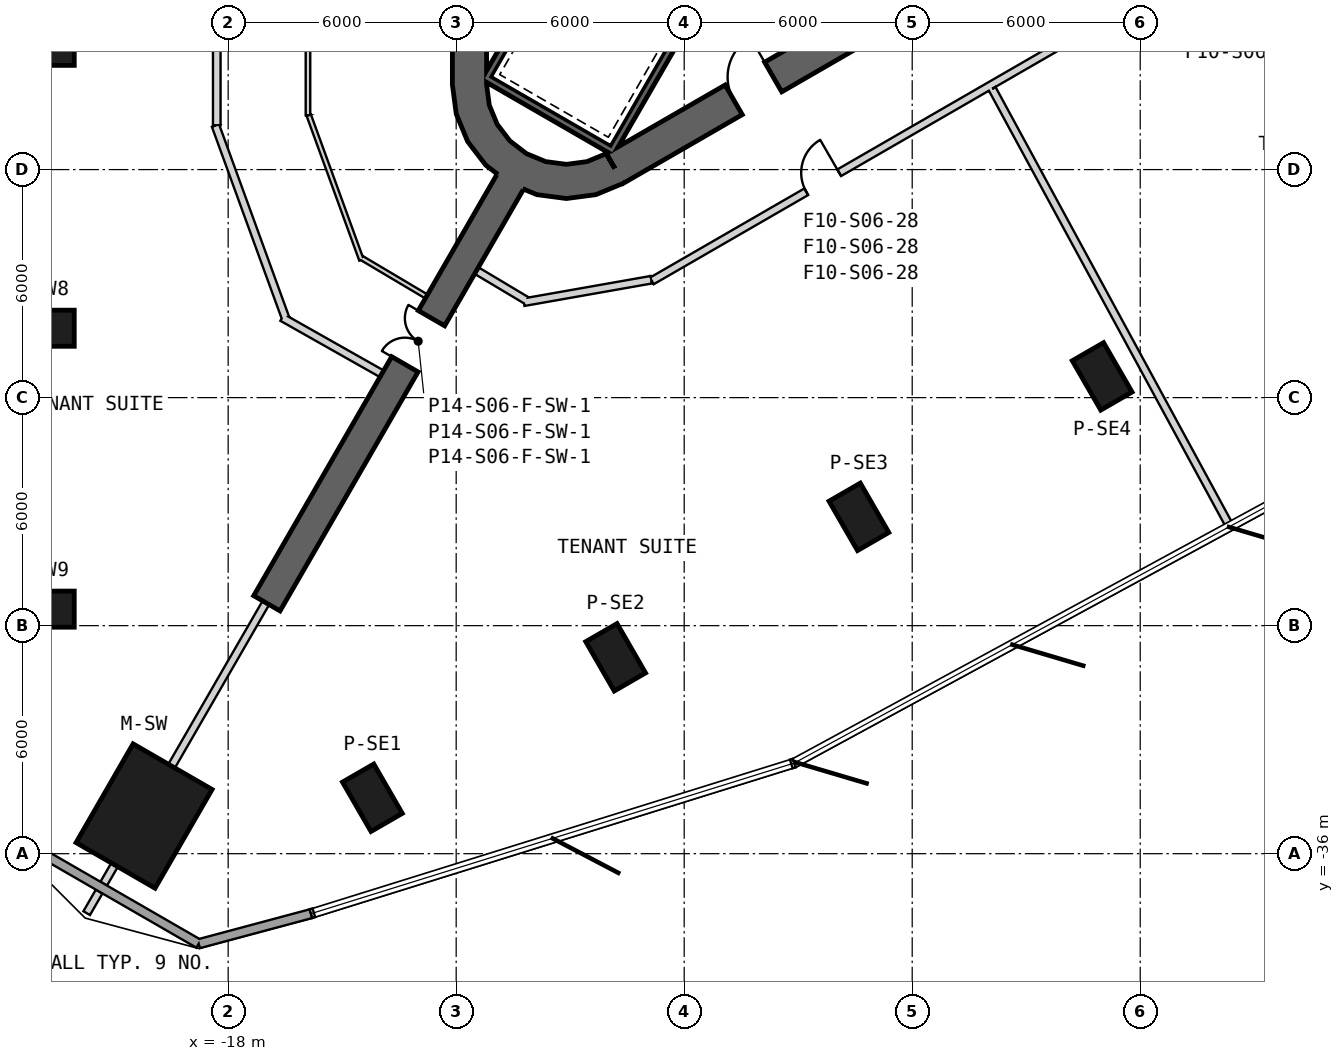
"""IFC4 building model, lengths in metres.
Left out: names, types, materials, properties, quantities, classifications, styles, units other than length and angle.
Written with IfcOpenShell. Run it as: python <this file> out.ifc"""

import sys

from ifc_helpers import new_model, si_unit, direction, frame, frame_2d, origin, origin_2d, place, context, subcontext, project, spatial, polyline, rectangle, outline, extrude, element, fill, save


model = new_model("IFC4")
c1 = context("Model", 3, precision=1e-05, world=origin(), true_north=direction((0.0, 1.0)))
c2 = subcontext(c1, "Body", "Model", "MODEL_VIEW")
j1 = project(units=[si_unit("LENGTHUNIT", "METRE"), si_unit("PLANEANGLEUNIT", "RADIAN")], contexts=[c1])
p1 = place(None, origin())
s1 = spatial("IfcSite", under=j1, at=p1, CompositionType="ELEMENT")
p2 = place(p1, origin())
s2 = spatial("IfcBuilding", under=s1, at=p2, CompositionType="ELEMENT")
p3 = place(p2, frame((0.0, 0.0, 119.3)))
s3 = spatial("IfcBuildingStorey", under=s2, at=p3, CompositionType="ELEMENT", Elevation=119.3)
p4 = place(p3, frame((-20.213, -35.01, 0.0), z_axis=(0.0, 0.0, 1.0), x_axis=(-0.5, -0.866025403784, 0.0)))
e1 = element("IfcColumn", 1, at=p4, inside=s3, PredefinedType="COLUMN", context=c2, shape_type="SweptSolid", body=[
    extrude(rectangle(XDim=3.0, YDim=2.4, at=origin_2d()), origin(), (0.0, 0.0, 1.0), 4.1),
])
for number, where, z_axis, x_axis in (
    (2, (-22.8, -14.783, 0.0), (0.0, 0.0, 1.0), (-1.0, 0.0, 0.0)),
    (3, (-22.8, -22.174, 0.0), (0.0, 0.0, 1.0), (-1.0, 0.0, 0.0)),
    (4, (-22.8, -29.566, 0.0), (0.0, 0.0, 1.0), (-1.0, 0.0, 0.0)),
    (5, (-14.205, -34.528, 0.0), (0.0, 0.0, 1.0), (0.5, -0.866, 0.0)),
    (6, (-7.803, -30.833, 0.0), (0.0, 0.0, 1.0), (0.5, -0.866, 0.0)),
    (7, (-1.402, -27.137, 0.0), (0.0, 0.0, 1.0), (0.5, -0.866, 0.0)),
    (8, (4.999, -23.441, 0.0), (0.0, 0.0, 1.0), (0.5, -0.866, 0.0)),
):
    element("IfcColumn", number, at=place(p3, frame(where, z_axis=z_axis, x_axis=x_axis)), inside=s3, PredefinedType="COLUMN", context=c2, shape_type="SweptSolid", body=[
        extrude(rectangle(XDim=1.5, YDim=0.95, at=origin_2d()), origin(), (0.0, 0.0, 1.0), 4.1),
    ])
p5 = place(p3, frame((-11.65, 15.762, 0.0), z_axis=(0.0, 0.0, 1.0), x_axis=(0.0, -1.0, 0.0)))
e9 = element("IfcWall", 9, at=p5, inside=s3, PredefinedType="SHEAR", context=c2, shape_type="SweptSolid", body=[
    extrude(rectangle(XDim=31.523, YDim=0.9, at=frame_2d((15.762, 0.0))), origin(), (0.0, 0.0, 1.0), 4.1),
])
p6 = place(p5, frame((7.062, 0.0, 0.0)))
e10 = element("IfcOpeningElement", 10, at=p6, cuts=e9, PredefinedType="OPENING", context=c2, shape_type="SweptSolid", body=[
    extrude(rectangle(XDim=1.2, YDim=2.4, at=frame_2d((0.6, 1.2))), frame((0.0, 0.46, 0.0), z_axis=(0.0, -1.0, 0.0), x_axis=(1.0, 0.0, 0.0)), (0.0, 0.0, 1.0), 0.92),
])
p7 = place(p5, frame((9.762, 0.0, 0.0)))
e11 = element("IfcOpeningElement", 11, at=p7, cuts=e9, PredefinedType="OPENING", context=c2, shape_type="SweptSolid", body=[
    extrude(rectangle(XDim=1.2, YDim=2.4, at=frame_2d((0.6, 1.2))), frame((0.0, 0.46, 0.0), z_axis=(0.0, -1.0, 0.0), x_axis=(1.0, 0.0, 0.0)), (0.0, 0.0, 1.0), 0.92),
])
p8 = place(p5, frame((12.462, 0.0, 0.0)))
e12 = element("IfcOpeningElement", 12, at=p8, cuts=e9, PredefinedType="OPENING", context=c2, shape_type="SweptSolid", body=[
    extrude(rectangle(XDim=1.2, YDim=2.4, at=frame_2d((0.6, 1.2))), frame((0.0, 0.46, 0.0), z_axis=(0.0, -1.0, 0.0), x_axis=(1.0, 0.0, 0.0)), (0.0, 0.0, 1.0), 0.92),
])
p9 = place(p5, frame((15.162, 0.0, 0.0)))
e13 = element("IfcOpeningElement", 13, at=p9, cuts=e9, PredefinedType="OPENING", context=c2, shape_type="SweptSolid", body=[
    extrude(rectangle(XDim=1.2, YDim=2.4, at=frame_2d((0.6, 1.2))), frame((0.0, 0.46, 0.0), z_axis=(0.0, -1.0, 0.0), x_axis=(1.0, 0.0, 0.0)), (0.0, 0.0, 1.0), 0.92),
])
p10 = place(p5, frame((17.862, 0.0, 0.0)))
e14 = element("IfcOpeningElement", 14, at=p10, cuts=e9, PredefinedType="OPENING", context=c2, shape_type="SweptSolid", body=[
    extrude(rectangle(XDim=1.2, YDim=2.4, at=frame_2d((0.6, 1.2))), frame((0.0, 0.46, 0.0), z_axis=(0.0, -1.0, 0.0), x_axis=(1.0, 0.0, 0.0)), (0.0, 0.0, 1.0), 0.92),
])
p11 = place(p5, frame((20.562, 0.0, 0.0)))
e15 = element("IfcOpeningElement", 15, at=p11, cuts=e9, PredefinedType="OPENING", context=c2, shape_type="SweptSolid", body=[
    extrude(rectangle(XDim=1.2, YDim=2.4, at=frame_2d((0.6, 1.2))), frame((0.0, 0.46, 0.0), z_axis=(0.0, -1.0, 0.0), x_axis=(1.0, 0.0, 0.0)), (0.0, 0.0, 1.0), 0.92),
])
p12 = place(p5, frame((23.262, 0.0, 0.0)))
e16 = element("IfcOpeningElement", 16, at=p12, cuts=e9, PredefinedType="OPENING", context=c2, shape_type="SweptSolid", body=[
    extrude(rectangle(XDim=1.2, YDim=2.4, at=frame_2d((0.6, 1.2))), frame((0.0, 0.46, 0.0), z_axis=(0.0, -1.0, 0.0), x_axis=(1.0, 0.0, 0.0)), (0.0, 0.0, 1.0), 0.92),
])
p13 = place(p5, frame((3.612, 0.0, 0.0)))
e17 = element("IfcOpeningElement", 17, at=p13, cuts=e9, PredefinedType="OPENING", context=c2, shape_type="SweptSolid", body=[
    extrude(rectangle(XDim=1.2, YDim=2.4, at=frame_2d((0.6, 1.2))), frame((0.0, 0.46, 0.0), z_axis=(0.0, -1.0, 0.0), x_axis=(1.0, 0.0, 0.0)), (0.0, 0.0, 1.0), 0.92),
])
p14 = place(p5, frame((26.712, 0.0, 0.0)))
e18 = element("IfcOpeningElement", 18, at=p14, cuts=e9, PredefinedType="OPENING", context=c2, shape_type="SweptSolid", body=[
    extrude(rectangle(XDim=1.2, YDim=2.4, at=frame_2d((0.6, 1.2))), frame((0.0, 0.46, 0.0), z_axis=(0.0, -1.0, 0.0), x_axis=(1.0, 0.0, 0.0)), (0.0, 0.0, 1.0), 0.92),
])
p15 = place(p3, frame((-7.825, -17.97, 0.0), z_axis=(0.0, 0.0, 1.0), x_axis=(0.866028369851, 0.499994862586, 0.0)))
e19 = element("IfcWall", 19, at=p15, inside=s3, PredefinedType="SHEAR", context=c2, shape_type="SweptSolid", body=[
    extrude(rectangle(XDim=31.523, YDim=0.9, at=frame_2d((15.762, 0.0))), origin(), (0.0, 0.0, 1.0), 4.1),
])
p16 = place(p15, frame((7.062, 0.0, 0.0)))
e20 = element("IfcOpeningElement", 20, at=p16, cuts=e19, PredefinedType="OPENING", context=c2, shape_type="SweptSolid", body=[
    extrude(rectangle(XDim=1.2, YDim=2.4, at=frame_2d((0.6, 1.2))), frame((0.0, 0.46, 0.0), z_axis=(0.0, -1.0, 0.0), x_axis=(1.0, 0.0, 0.0)), (0.0, 0.0, 1.0), 0.92),
])
p17 = place(p15, frame((9.762, 0.0, 0.0)))
e21 = element("IfcOpeningElement", 21, at=p17, cuts=e19, PredefinedType="OPENING", context=c2, shape_type="SweptSolid", body=[
    extrude(rectangle(XDim=1.2, YDim=2.4, at=frame_2d((0.6, 1.2))), frame((0.0, 0.46, 0.0), z_axis=(0.0, -1.0, 0.0), x_axis=(1.0, 0.0, 0.0)), (0.0, 0.0, 1.0), 0.92),
])
p18 = place(p15, frame((12.462, 0.0, 0.0)))
e22 = element("IfcOpeningElement", 22, at=p18, cuts=e19, PredefinedType="OPENING", context=c2, shape_type="SweptSolid", body=[
    extrude(rectangle(XDim=1.2, YDim=2.4, at=frame_2d((0.6, 1.2))), frame((0.0, 0.46, 0.0), z_axis=(0.0, -1.0, 0.0), x_axis=(1.0, 0.0, 0.0)), (0.0, 0.0, 1.0), 0.92),
])
p19 = place(p15, frame((15.162, 0.0, 0.0)))
e23 = element("IfcOpeningElement", 23, at=p19, cuts=e19, PredefinedType="OPENING", context=c2, shape_type="SweptSolid", body=[
    extrude(rectangle(XDim=1.2, YDim=2.4, at=frame_2d((0.6, 1.2))), frame((0.0, 0.46, 0.0), z_axis=(0.0, -1.0, 0.0), x_axis=(1.0, 0.0, 0.0)), (0.0, 0.0, 1.0), 0.92),
])
p20 = place(p15, frame((17.862, 0.0, 0.0)))
e24 = element("IfcOpeningElement", 24, at=p20, cuts=e19, PredefinedType="OPENING", context=c2, shape_type="SweptSolid", body=[
    extrude(rectangle(XDim=1.2, YDim=2.4, at=frame_2d((0.6, 1.2))), frame((0.0, 0.46, 0.0), z_axis=(0.0, -1.0, 0.0), x_axis=(1.0, 0.0, 0.0)), (0.0, 0.0, 1.0), 0.92),
])
p21 = place(p15, frame((20.562, 0.0, 0.0)))
e25 = element("IfcOpeningElement", 25, at=p21, cuts=e19, PredefinedType="OPENING", context=c2, shape_type="SweptSolid", body=[
    extrude(rectangle(XDim=1.2, YDim=2.4, at=frame_2d((0.6, 1.2))), frame((0.0, 0.46, 0.0), z_axis=(0.0, -1.0, 0.0), x_axis=(1.0, 0.0, 0.0)), (0.0, 0.0, 1.0), 0.92),
])
p22 = place(p15, frame((26.712, 0.0, 0.0)))
e26 = element("IfcOpeningElement", 26, at=p22, cuts=e19, PredefinedType="OPENING", context=c2, shape_type="SweptSolid", body=[
    extrude(rectangle(XDim=1.2, YDim=2.4, at=frame_2d((0.6, 1.2))), frame((0.0, 0.46, 0.0), z_axis=(0.0, -1.0, 0.0), x_axis=(1.0, 0.0, 0.0)), (0.0, 0.0, 1.0), 0.92),
])
p23 = place(p15, frame((3.612, 0.0, 0.0)))
e27 = element("IfcOpeningElement", 27, at=p23, cuts=e19, PredefinedType="OPENING", context=c2, shape_type="SweptSolid", body=[
    extrude(rectangle(XDim=1.2, YDim=2.4, at=frame_2d((0.6, 1.2))), frame((0.0, 0.46, 0.0), z_axis=(0.0, -1.0, 0.0), x_axis=(1.0, 0.0, 0.0)), (0.0, 0.0, 1.0), 0.92),
])
p24 = place(p3, origin())
e28 = element("IfcWall", 28, at=p24, inside=s3, PredefinedType="SHEAR", context=c2, shape_type="SweptSolid", body=[
    extrude(outline(polyline([(-12.1, -15.762), (-11.998, -16.538), (-11.698, -17.262), (-11.221, -17.883), (-10.6, -18.36), (-9.876, -18.659), (-9.1, -18.762), (-8.323, -18.659), (-7.6, -18.36), (-8.05, -17.58), (-8.556, -17.79), (-9.1, -17.862), (-9.644, -17.79), (-10.15, -17.58), (-10.585, -17.247), (-10.919, -16.812), (-11.128, -16.305), (-11.2, -15.762), (-12.1, -15.762)])), origin(), (0.0, 0.0, 1.0), 4.1),
])
p25 = place(p3, frame((-10.575, -18.316, 0.0), z_axis=(0.0, 0.0, 1.0), x_axis=(-0.500008359956, -0.866020577108, 0.0)))
e29 = element("IfcWall", 29, at=p25, inside=s3, PredefinedType="SHEAR", context=c2, shape_type="SweptSolid", body=[
    extrude(rectangle(XDim=12.812, YDim=0.8, at=frame_2d((6.406, 0.0))), origin(), (0.0, 0.0, 1.0), 4.1),
])
p26 = place(p25, frame((4.15, 0.0, 0.0)))
e30 = element("IfcOpeningElement", 30, at=p26, cuts=e29, PredefinedType="OPENING", context=c2, shape_type="SweptSolid", body=[
    extrude(rectangle(XDim=1.4, YDim=2.4, at=frame_2d((0.7, 1.2))), frame((0.0, 0.41, 0.0), z_axis=(0.0, -1.0, 0.0), x_axis=(1.0, 0.0, 0.0)), (0.0, 0.0, 1.0), 0.82),
])
p27 = place(p3, frame((-23.842, -35.445, 0.0), z_axis=(0.0, 0.0, 1.0), x_axis=(0.866031321059, -0.49998975084, 0.0)))
e31 = element("IfcWall", 31, at=p27, inside=s3, PredefinedType="SOLIDWALL", context=c2, shape_type="SweptSolid", body=[
    extrude(rectangle(XDim=5.851, YDim=0.24, at=frame_2d((2.925, 0.0))), origin(), (0.0, 0.0, 1.0), 3.8),
])
p28 = place(p3, frame((-18.775, -38.37, 0.0), z_axis=(0.0, 0.0, 1.0), x_axis=(0.965924175265, 0.258825206729, 0.0)))
e32 = element("IfcWall", 32, at=p28, inside=s3, PredefinedType="SOLIDWALL", context=c2, shape_type="SweptSolid", body=[
    extrude(rectangle(XDim=3.058, YDim=0.24, at=frame_2d((1.529, 0.0))), origin(), (0.0, 0.0, 1.0), 3.8),
])
p29 = place(p3, frame((-3.905, -10.563, -0.3), z_axis=(0.0, 0.0, 1.0), x_axis=(-0.500012932018, -0.866017937352, 0.0)))
e33 = element("IfcWall", 33, at=p29, inside=s3, PredefinedType="SHEAR", context=c2, shape_type="SweptSolid", body=[
    extrude(rectangle(XDim=8.1, YDim=0.2, at=frame_2d((4.05, 0.0))), origin(), (0.0, 0.0, 1.0), 4.1),
])
p30 = place(p3, frame((-11.282, -15.541, -0.3), z_axis=(0.0, 0.0, 1.0), x_axis=(0.866000483506, -0.500043160704, 0.0)))
e34 = element("IfcWall", 34, at=p30, inside=s3, PredefinedType="SHEAR", context=c2, shape_type="SweptSolid", body=[
    extrude(rectangle(XDim=3.8, YDim=0.2, at=frame_2d((1.9, 0.0))), origin(), (0.0, 0.0, 1.0), 4.1),
])
p31 = place(p3, frame((-7.196, -8.663, -0.3), z_axis=(0.0, 0.0, 1.0), x_axis=(-0.499997992926, -0.866026562566, 0.0)))
e35 = element("IfcWall", 35, at=p31, inside=s3, PredefinedType="SHEAR", context=c2, shape_type="SweptSolid", body=[
    extrude(rectangle(XDim=7.9, YDim=0.2, at=frame_2d((3.95, 0.0))), origin(), (0.0, 0.0, 1.0), 4.1),
])
p32 = place(p3, frame((-15.9, 16.451, 0.0), z_axis=(0.0, 0.0, 1.0), x_axis=(0.0, -1.0, 0.0)))
e36 = element("IfcWall", 36, at=p32, inside=s3, PredefinedType="PARTITIONING", context=c2, shape_type="SweptSolid", body=[
    extrude(rectangle(XDim=33.022, YDim=0.12, at=frame_2d((16.511, 0.0))), origin(), (0.0, 0.0, 1.0), 2.98),
])
p33 = place(p32, frame((15.981, 0.0, 0.0)))
e37 = element("IfcOpeningElement", 37, at=p33, cuts=e36, PredefinedType="OPENING", context=c2, shape_type="SweptSolid", body=[
    extrude(rectangle(XDim=1.0, YDim=2.1, at=frame_2d((0.5, 1.05))), frame((0.0, 0.07, 0.0), z_axis=(0.0, -1.0, 0.0), x_axis=(1.0, 0.0, 0.0)), (0.0, 0.0, 1.0), 0.14),
])
p34 = place(p3, frame((-15.879, -16.567, 0.0), z_axis=(0.0, 0.0, 1.0), x_axis=(0.341999322503, -0.939700198685, 0.0)))
e38 = element("IfcWall", 38, at=p34, inside=s3, PredefinedType="PARTITIONING", context=c2, shape_type="SweptSolid", body=[
    extrude(rectangle(XDim=4.054, YDim=0.12, at=frame_2d((2.027, 0.0))), origin(), (0.0, 0.0, 1.0), 2.88),
])
p35 = place(p3, frame((-14.494, -20.322, 0.0), z_axis=(0.0, 0.0, 1.0), x_axis=(0.859745408261, -0.510722853389, 0.0)))
e39 = element("IfcWall", 39, at=p35, inside=s3, PredefinedType="PARTITIONING", context=c2, shape_type="SweptSolid", body=[
    extrude(rectangle(XDim=1.991, YDim=0.12, at=frame_2d((0.996, 0.0))), origin(), (0.0, 0.0, 1.0), 3.8),
])
p36 = place(p3, frame((-16.576, -21.892, 0.0), z_axis=(0.0, 0.0, 1.0), x_axis=(0.870559817111, -0.492062602553, 0.0)))
e40 = element("IfcWall", 40, at=p36, inside=s3, PredefinedType="PARTITIONING", context=c2, shape_type="SweptSolid", body=[
    extrude(rectangle(XDim=3.01, YDim=0.2, at=frame_2d((1.505, 0.0))), origin(), (0.0, 0.0, 1.0), 3.8),
])
p37 = place(p3, frame((-18.334, -16.84, 0.0), z_axis=(0.0, 0.0, 1.0), x_axis=(0.342015877493, -0.939694173411, 0.0)))
e41 = element("IfcWall", 41, at=p37, inside=s3, PredefinedType="PARTITIONING", context=c2, shape_type="SweptSolid", body=[
    extrude(rectangle(XDim=5.389, YDim=0.2, at=frame_2d((2.694, 0.0))), origin(), (0.0, 0.0, 1.0), 2.88),
])
p38 = place(p3, frame((-18.3, 10.13, 0.0), z_axis=(0.0, 0.0, 1.0), x_axis=(0.0, -1.0, 0.0)))
e42 = element("IfcWall", 42, at=p38, inside=s3, PredefinedType="PARTITIONING", context=c2, shape_type="SweptSolid", body=[
    extrude(rectangle(XDim=26.964, YDim=0.2, at=frame_2d((13.482, 0.0))), origin(), (0.0, 0.0, 1.0), 3.08),
])
p39 = place(p38, frame((21.434, 0.0, 0.0)))
e43 = element("IfcOpeningElement", 43, at=p39, cuts=e42, PredefinedType="OPENING", context=c2, shape_type="SweptSolid", body=[
    extrude(rectangle(XDim=1.0, YDim=2.1, at=frame_2d((0.5, 1.05))), frame((0.0, 0.11, 0.0), z_axis=(0.0, -1.0, 0.0), x_axis=(1.0, 0.0, 0.0)), (0.0, 0.0, 1.0), 0.22),
])
p40 = place(p38, frame((7.952, 0.0, 0.0)))
e44 = element("IfcOpeningElement", 44, at=p40, cuts=e42, PredefinedType="OPENING", context=c2, shape_type="SweptSolid", body=[
    extrude(rectangle(XDim=1.0, YDim=2.1, at=frame_2d((0.5, 1.05))), frame((0.0, 0.11, 0.0), z_axis=(0.0, -1.0, 0.0), x_axis=(1.0, 0.0, 0.0)), (0.0, 0.0, 1.0), 0.22),
])
p41 = place(p3, frame((-6.852, -20.93, 0.0), z_axis=(0.0, 0.0, 1.0), x_axis=(0.866023703603, 0.500002944789, 0.0)))
e45 = element("IfcWall", 45, at=p41, inside=s3, PredefinedType="PARTITIONING", context=c2, shape_type="SweptSolid", body=[
    extrude(rectangle(XDim=32.599, YDim=0.2, at=frame_2d((16.299, 0.0))), origin(), (0.0, 0.0, 1.0), 2.98),
])
p42 = place(p41, frame((27.463, 0.0, 0.0)))
e46 = element("IfcOpeningElement", 46, at=p42, cuts=e45, PredefinedType="OPENING", context=c2, shape_type="SweptSolid", body=[
    extrude(rectangle(XDim=1.0, YDim=2.1, at=frame_2d((0.5, 1.05))), frame((0.0, 0.11, 0.0), z_axis=(0.0, -1.0, 0.0), x_axis=(1.0, 0.0, 0.0)), (0.0, 0.0, 1.0), 0.22),
])
p43 = place(p41, frame((16.307, 0.0, 0.0)))
e47 = element("IfcOpeningElement", 47, at=p43, cuts=e45, PredefinedType="OPENING", context=c2, shape_type="SweptSolid", body=[
    extrude(rectangle(XDim=1.0, YDim=2.1, at=frame_2d((0.5, 1.05))), frame((0.0, 0.11, 0.0), z_axis=(0.0, -1.0, 0.0), x_axis=(1.0, 0.0, 0.0)), (0.0, 0.0, 1.0), 0.22),
])
p44 = place(p41, frame((4.694, 0.0, 0.0)))
e48 = element("IfcOpeningElement", 48, at=p44, cuts=e45, PredefinedType="OPENING", context=c2, shape_type="SweptSolid", body=[
    extrude(rectangle(XDim=1.0, YDim=2.1, at=frame_2d((0.5, 1.05))), frame((0.0, 0.11, 0.0), z_axis=(0.0, -1.0, 0.0), x_axis=(1.0, 0.0, 0.0)), (0.0, 0.0, 1.0), 0.22),
])
p45 = place(p3, frame((-10.22, -21.49, 0.0), z_axis=(0.0, 0.0, 1.0), x_axis=(0.984805188344, 0.173662721995, 0.0)))
e49 = element("IfcWall", 49, at=p45, inside=s3, PredefinedType="PARTITIONING", context=c2, shape_type="SweptSolid", body=[
    extrude(rectangle(XDim=3.408, YDim=0.2, at=frame_2d((1.704, 0.0))), origin(), (0.0, 0.0, 1.0), 2.88),
])
p46 = place(p3, frame((-11.465, -20.657, 0.0), z_axis=(0.0, 0.0, 1.0), x_axis=(0.858376755127, -0.513019830276, 0.0)))
e50 = element("IfcWall", 50, at=p46, inside=s3, PredefinedType="PARTITIONING", context=c2, shape_type="SweptSolid", body=[
    extrude(rectangle(XDim=1.533, YDim=0.2, at=frame_2d((0.767, 0.0))), origin(), (0.0, 0.0, 1.0), 3.8),
])
p47 = place(p3, frame((-17.007, -29.397, 0.0), z_axis=(0.0, 0.0, 1.0), x_axis=(-0.500006314404, -0.866021758131, 0.0)))
e51 = element("IfcWall", 51, at=p47, inside=s3, PredefinedType="PARTITIONING", context=c2, shape_type="SweptSolid", body=[
    extrude(rectangle(XDim=4.963, YDim=0.2, at=frame_2d((2.482, 0.0))), origin(), (0.0, 0.0, 1.0), 3.37),
])
p48 = place(p3, frame((-20.989, -36.293, 0.0), z_axis=(0.0, 0.0, 1.0), x_axis=(-0.499857944771, -0.866107403877, 0.0)))
e52 = element("IfcWall", 52, at=p48, inside=s3, PredefinedType="PARTITIONING", context=c2, shape_type="SweptSolid", body=[
    extrude(rectangle(XDim=0.572, YDim=0.2, at=frame_2d((0.286, 0.0))), origin(), (0.0, 0.0, 1.0), 3.8),
])
p49 = place(p3, frame((-21.395, -36.997, 0.0), z_axis=(0.0, 0.0, 1.0), x_axis=(-0.499862072928, -0.866105021373, 0.0)))
e53 = element("IfcWall", 53, at=p49, inside=s3, PredefinedType="PARTITIONING", context=c2, shape_type="SweptSolid", body=[
    extrude(rectangle(XDim=0.656, YDim=0.2, at=frame_2d((0.328, 0.0))), origin(), (0.0, 0.0, 1.0), 3.8),
])
p50 = place(p3, frame((8.358, -27.39, 0.0), z_axis=(0.0, 0.0, 1.0), x_axis=(-0.477258783959, 0.878762796854, 0.0)))
e54 = element("IfcWall", 54, at=p50, inside=s3, PredefinedType="PARTITIONING", context=c2, shape_type="SweptSolid", body=[
    extrude(rectangle(XDim=13.104, YDim=0.2, at=frame_2d((6.552, 0.0))), origin(), (0.0, 0.0, 1.0), 3.08),
])
p51 = place(p44, origin())
e55 = element("IfcDoor", 55, at=p51, inside=s3, OperationType="SINGLE_SWING_LEFT", PredefinedType="USERDEFINED", context=c2, shape_type="SweptSolid", body=[
    extrude(rectangle(XDim=1.0, YDim=2.1, at=frame_2d((0.5, 1.05))), frame((0.0, 0.025, 0.0), z_axis=(0.0, -1.0, 0.0), x_axis=(1.0, 0.0, 0.0)), (0.0, 0.0, 1.0), 0.05),
])
fill(e48, e55)
p52 = place(p23, origin())
e56 = element("IfcDoor", 56, at=p52, inside=s3, OperationType="SINGLE_SWING_RIGHT", PredefinedType="USERDEFINED", context=c2, shape_type="SweptSolid", body=[
    extrude(rectangle(XDim=1.2, YDim=2.4, at=frame_2d((0.6, 1.2))), frame((0.0, 0.025, 0.0), z_axis=(0.0, -1.0, 0.0), x_axis=(1.0, 0.0, 0.0)), (0.0, 0.0, 1.0), 0.05),
])
fill(e27, e56)
p53 = place(p26, origin())
e57 = element("IfcDoor", 57, at=p53, inside=s3, OperationType="DOUBLE_DOOR_SINGLE_SWING", PredefinedType="NOTDEFINED", context=c2, shape_type="SweptSolid", body=[
    extrude(rectangle(XDim=1.4, YDim=2.4, at=frame_2d((0.7, 1.2))), frame((0.0, 0.025, 0.0), z_axis=(0.0, -1.0, 0.0), x_axis=(1.0, 0.0, 0.0)), (0.0, 0.0, 1.0), 0.05),
])
fill(e30, e57)
save(model, sys.argv[1])
